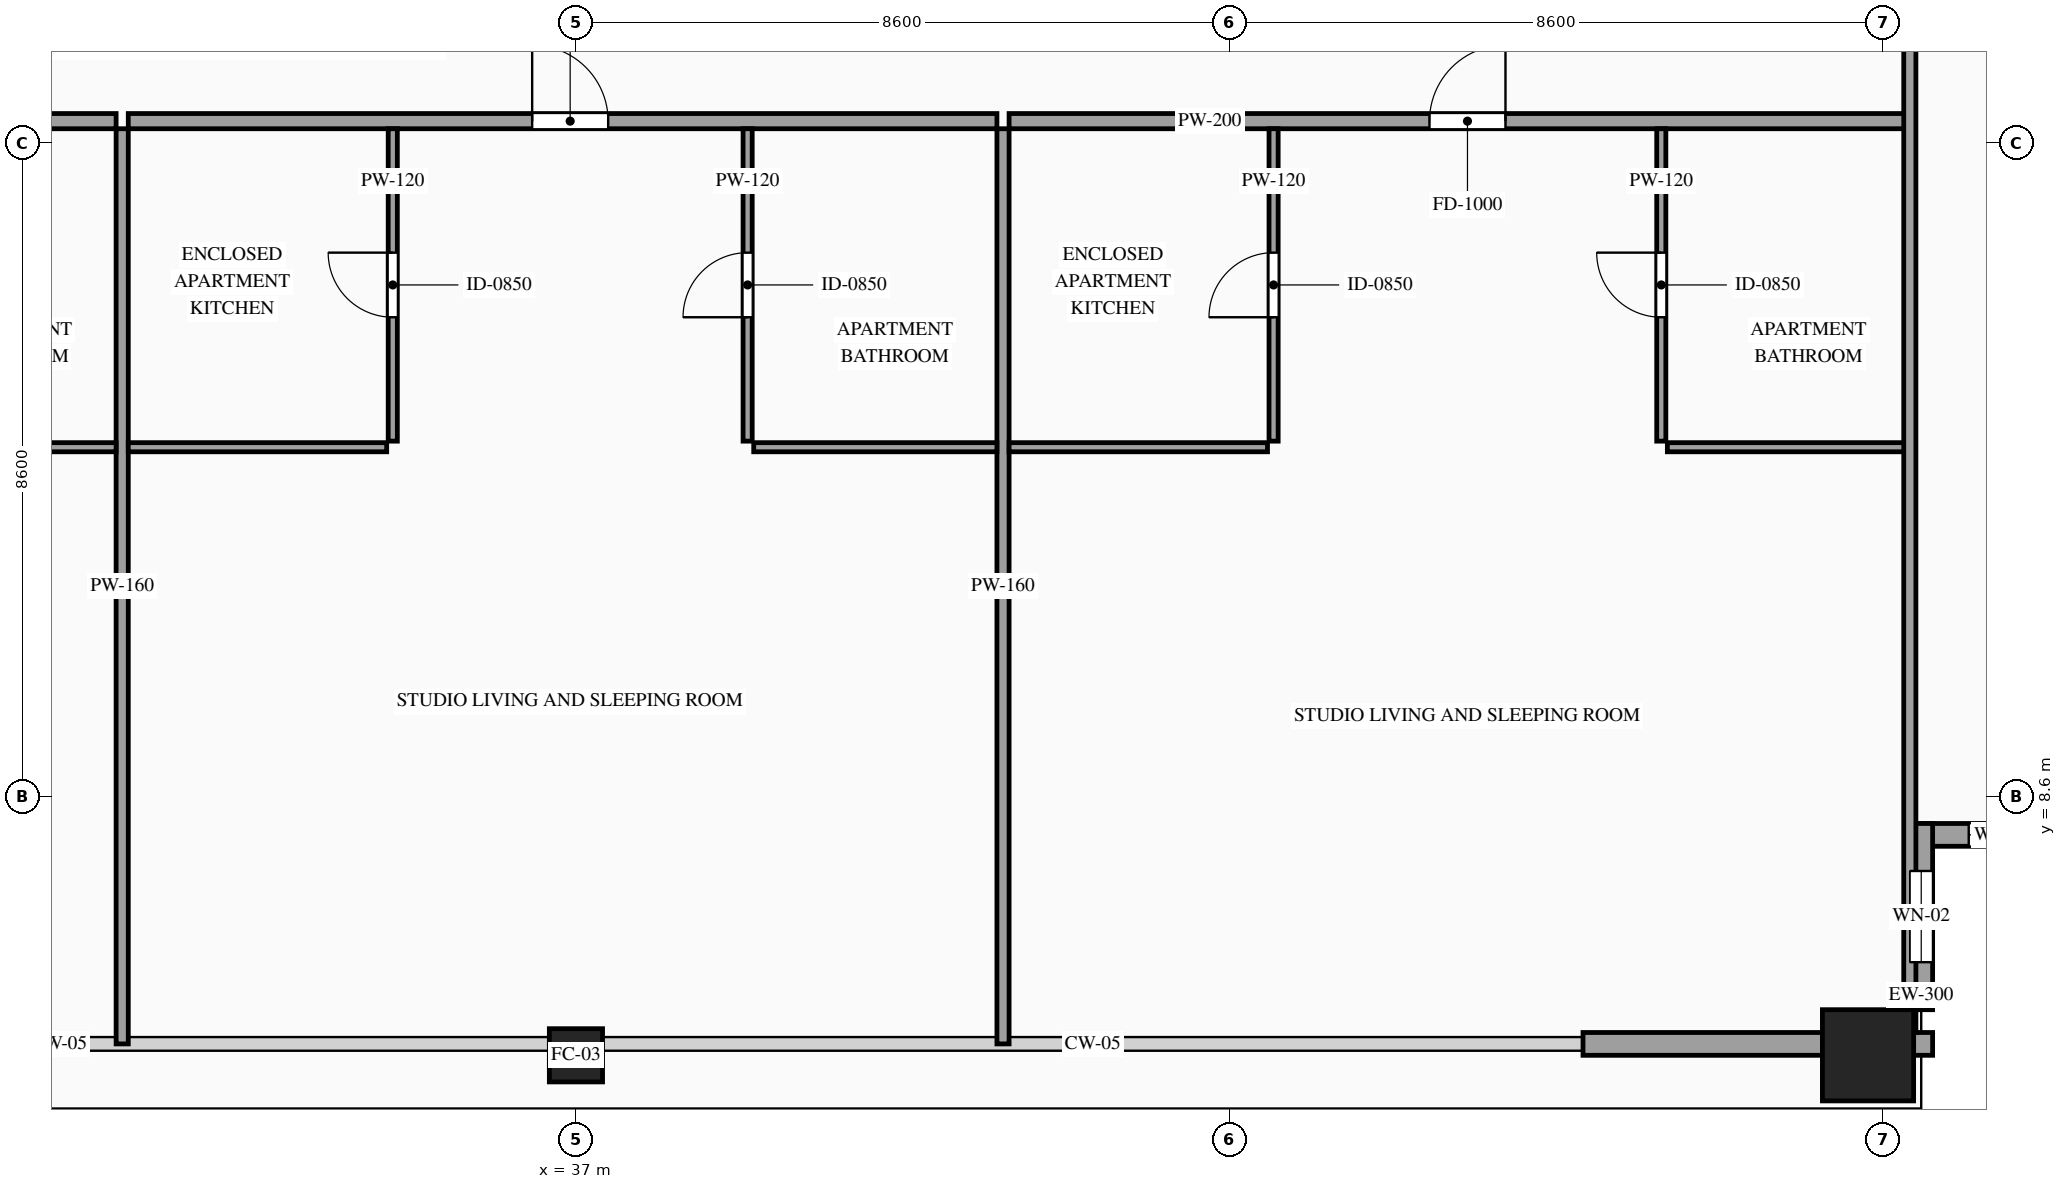
"""IFC4 building model, lengths in metres.
Left out: names, types, materials, properties, quantities, classifications, styles, units other than length and angle.
Written with IfcOpenShell. Run it as: python <this file> out.ifc"""

import sys

from ifc_helpers import new_model, si_unit, direction, frame, frame_2d, origin, origin_2d, place, context, subcontext, project, spatial, rectangle, hollow_rectangle, extrude, source, transform, mapped, element, fill, save


model = new_model("IFC4")
c1 = context("Model", 3, precision=1e-05, world=origin(), true_north=direction((0.0, 1.0)))
c2 = subcontext(c1, "Body", "Model", "MODEL_VIEW")
j1 = project(units=[si_unit("LENGTHUNIT", "METRE"), si_unit("PLANEANGLEUNIT", "RADIAN")], contexts=[c1])
p1 = place(None, origin())
s1 = spatial("IfcSite", under=j1, at=p1, CompositionType="ELEMENT")
p2 = place(p1, origin())
s2 = spatial("IfcBuilding", under=s1, at=p2, CompositionType="ELEMENT")
p3 = place(p2, frame((0.0, 0.0, 238.1)))
s3 = spatial("IfcBuildingStorey", under=s2, at=p3, CompositionType="ELEMENT", Elevation=238.1)
m1 = source(origin(), c2, "Body", "SweptSolid", [
    extrude(hollow_rectangle(XDim=0.7, YDim=0.7, WallThickness=0.032, at=origin_2d()), origin(), (0.0, 0.0, 1.0), 3.5),
])
p4 = place(p3, frame((37.0, 5.2, 0.0), z_axis=(0.0, 0.0, 1.0), x_axis=(1.0, 0.0, 0.0)))
e1 = element("IfcColumn", 1, at=p4, inside=s3, PredefinedType="COLUMN", context=c2, shape_type="MappedRepresentation", body=[
    mapped(m1, transform((0.0, 0.0, 0.0), scale=1.0)),
])
m2 = source(origin(), c2, "Body", "SweptSolid", [
    extrude(hollow_rectangle(XDim=1.2, YDim=1.2, WallThickness=0.055, at=origin_2d()), origin(), (0.0, 0.0, 1.0), 3.5),
])
p5 = place(p3, frame((54.0, 5.2, 0.0), z_axis=(0.0, 0.0, 1.0), x_axis=(1.0, 0.0, 0.0)))
e2 = element("IfcColumn", 2, at=p5, inside=s3, PredefinedType="COLUMN", context=c2, shape_type="MappedRepresentation", body=[
    mapped(m2, transform((0.0, 0.0, 0.0), scale=1.0)),
])
p6 = place(p3, frame((54.55, 8.1, 0.0), z_axis=(0.0, 0.0, 1.0), x_axis=(1.0, 0.0, 0.0)))
e3 = element("IfcWall", 3, at=p6, inside=s3, PredefinedType="SOLIDWALL", context=c2, shape_type="SweptSolid", body=[
    extrude(rectangle(XDim=2.45, YDim=0.3, at=frame_2d((1.225, 0.0))), origin(), (0.0, 0.0, 1.0), 3.28),
])
p7 = place(p6, frame((0.775, 0.0, 0.85)))
e4 = element("IfcOpeningElement", 4, at=p7, cuts=e3, PredefinedType="OPENING", context=c2, shape_type="SweptSolid", body=[
    extrude(rectangle(XDim=0.9, YDim=1.5, at=frame_2d((0.45, 0.75))), frame((0.0, 0.165, 0.0), z_axis=(0.0, -1.0, 0.0), x_axis=(1.0, 0.0, 0.0)), (0.0, 0.0, 1.0), 0.33),
])
p8 = place(p3, frame((54.7, 5.8, 0.0), z_axis=(0.0, 0.0, 1.0), x_axis=(0.0, 1.0, 0.0)))
e5 = element("IfcWall", 5, at=p8, inside=s3, PredefinedType="SOLIDWALL", context=c2, shape_type="SweptSolid", body=[
    extrude(rectangle(XDim=2.45, YDim=0.3, at=frame_2d((1.225, 0.0))), origin(), (0.0, 0.0, 1.0), 3.28),
])
p9 = place(p8, frame((0.625, 0.0, 0.85)))
e6 = element("IfcOpeningElement", 6, at=p9, cuts=e5, PredefinedType="OPENING", context=c2, shape_type="SweptSolid", body=[
    extrude(rectangle(XDim=1.2, YDim=2.1, at=frame_2d((0.6, 1.05))), frame((0.0, 0.165, 0.0), z_axis=(0.0, -1.0, 0.0), x_axis=(1.0, 0.0, 0.0)), (0.0, 0.0, 1.0), 0.33),
])
m3 = source(origin(), c2, "Body", "SweptSolid", [
    extrude(rectangle(XDim=0.25, YDim=0.3, at=frame_2d((0.125, 0.0))), origin(), (0.0, 0.0, 1.0), 3.28),
])
p10 = place(p3, frame((54.6, 5.35, 0.0), z_axis=(0.0, 0.0, 1.0), x_axis=(1.0, 0.0, 0.0)))
e7 = element("IfcWall", 7, at=p10, inside=s3, PredefinedType="SOLIDWALL", context=c2, shape_type="MappedRepresentation", body=[
    mapped(m3, transform((0.0, 0.0, 0.0), scale=1.0)),
])
m4 = source(origin(), c2, "Body", "SweptSolid", [
    extrude(rectangle(XDim=3.15, YDim=0.3, at=frame_2d((1.575, 0.0))), origin(), (0.0, 0.0, 1.0), 2.835),
])
p11 = place(p3, frame((50.25, 5.35, 0.0), z_axis=(0.0, 0.0, 1.0), x_axis=(1.0, 0.0, 0.0)))
e8 = element("IfcWall", 8, at=p11, inside=s3, PredefinedType="SOLIDWALL", context=c2, shape_type="MappedRepresentation", body=[
    mapped(m4, transform((0.0, 0.0, 0.0), scale=1.0)),
])
p12 = place(p3, frame((19.44, 17.49, 0.0), z_axis=(0.0, 0.0, 1.0), x_axis=(1.0, 0.0, 0.0)))
e9 = element("IfcWall", 9, at=p12, inside=s3, PredefinedType="PARTITIONING", context=c2, shape_type="SweptSolid", body=[
    extrude(rectangle(XDim=11.51, YDim=0.2, at=frame_2d((5.755, 0.0))), origin(), (0.0, 0.0, 1.0), 3.28),
])
p13 = place(p12, frame((5.355, 0.0, 0.0)))
e10 = element("IfcOpeningElement", 10, at=p13, cuts=e9, PredefinedType="OPENING", context=c2, shape_type="SweptSolid", body=[
    extrude(rectangle(XDim=1.0, YDim=2.2, at=frame_2d((0.5, 1.1))), frame((0.0, 0.115, 0.0), z_axis=(0.0, -1.0, 0.0), x_axis=(1.0, 0.0, 0.0)), (0.0, 0.0, 1.0), 0.23),
])
m5 = source(origin(), c2, "Body", "SweptSolid", [
    extrude(rectangle(XDim=12.04, YDim=0.16, at=frame_2d((6.02, 0.0))), origin(), (0.0, 0.0, 1.0), 3.28),
])
p14 = place(p3, frame((31.03, 5.35, 0.0), z_axis=(0.0, 0.0, 1.0), x_axis=(0.0, 1.0, 0.0)))
e11 = element("IfcWall", 11, at=p14, inside=s3, PredefinedType="PARTITIONING", context=c2, shape_type="MappedRepresentation", body=[
    mapped(m5, transform((0.0, 0.0, 0.0), scale=1.0)),
])
m6 = source(origin(), c2, "Body", "SweptSolid", [
    extrude(rectangle(XDim=3.2, YDim=0.12, at=frame_2d((1.6, 0.0))), origin(), (0.0, 0.0, 1.0), 3.28),
])
p15 = place(p3, frame((27.75, 13.2, 0.0), z_axis=(0.0, 0.0, 1.0), x_axis=(1.0, 0.0, 0.0)))
e12 = element("IfcWall", 12, at=p15, inside=s3, PredefinedType="PARTITIONING", context=c2, shape_type="MappedRepresentation", body=[
    mapped(m6, transform((0.0, 0.0, 0.0), scale=1.0)),
])
p16 = place(p3, frame((31.11, 17.49, 0.0), z_axis=(0.0, 0.0, 1.0), x_axis=(1.0, 0.0, 0.0)))
e13 = element("IfcWall", 13, at=p16, inside=s3, PredefinedType="PARTITIONING", context=c2, shape_type="SweptSolid", body=[
    extrude(rectangle(XDim=11.429, YDim=0.2, at=frame_2d((5.714, 0.0))), origin(), (0.0, 0.0, 1.0), 3.28),
])
p17 = place(p16, frame((5.314, 0.0, 0.0)))
e14 = element("IfcOpeningElement", 14, at=p17, cuts=e13, PredefinedType="OPENING", context=c2, shape_type="SweptSolid", body=[
    extrude(rectangle(XDim=1.0, YDim=2.2, at=frame_2d((0.5, 1.1))), frame((0.0, 0.115, 0.0), z_axis=(0.0, -1.0, 0.0), x_axis=(1.0, 0.0, 0.0)), (0.0, 0.0, 1.0), 0.23),
])
p18 = place(p3, frame((42.619, 5.35, 0.0), z_axis=(0.0, 0.0, 1.0), x_axis=(0.0, 1.0, 0.0)))
e15 = element("IfcWall", 15, at=p18, inside=s3, PredefinedType="PARTITIONING", context=c2, shape_type="MappedRepresentation", body=[
    mapped(m5, transform((0.0, 0.0, 0.0), scale=1.0)),
])
m7 = source(origin(), c2, "Body", "SweptSolid", [
    extrude(rectangle(XDim=3.4, YDim=0.12, at=frame_2d((1.7, 0.0))), origin(), (0.0, 0.0, 1.0), 3.28),
])
p19 = place(p3, frame((31.11, 13.2, 0.0), z_axis=(0.0, 0.0, 1.0), x_axis=(1.0, 0.0, 0.0)))
e16 = element("IfcWall", 16, at=p19, inside=s3, PredefinedType="PARTITIONING", context=c2, shape_type="MappedRepresentation", body=[
    mapped(m7, transform((0.0, 0.0, 0.0), scale=1.0)),
])
p20 = place(p3, frame((34.59, 13.28, 0.0), z_axis=(0.0, 0.0, 1.0), x_axis=(0.0, 1.0, 0.0)))
e17 = element("IfcWall", 17, at=p20, inside=s3, PredefinedType="PARTITIONING", context=c2, shape_type="SweptSolid", body=[
    extrude(rectangle(XDim=4.11, YDim=0.12, at=frame_2d((2.055, 0.0))), origin(), (0.0, 0.0, 1.0), 3.28),
])
p21 = place(p20, frame((1.63, 0.0, 0.0)))
e18 = element("IfcOpeningElement", 18, at=p21, cuts=e17, PredefinedType="OPENING", context=c2, shape_type="SweptSolid", body=[
    extrude(rectangle(XDim=0.85, YDim=2.1, at=frame_2d((0.425, 1.05))), frame((0.0, 0.075, 0.0), z_axis=(0.0, -1.0, 0.0), x_axis=(1.0, 0.0, 0.0)), (0.0, 0.0, 1.0), 0.15),
])
p22 = place(p3, frame((39.339, 13.2, 0.0), z_axis=(0.0, 0.0, 1.0), x_axis=(1.0, 0.0, 0.0)))
e19 = element("IfcWall", 19, at=p22, inside=s3, PredefinedType="PARTITIONING", context=c2, shape_type="MappedRepresentation", body=[
    mapped(m6, transform((0.0, 0.0, 0.0), scale=1.0)),
])
p23 = place(p3, frame((39.259, 13.28, 0.0), z_axis=(0.0, 0.0, 1.0), x_axis=(0.0, 1.0, 0.0)))
e20 = element("IfcWall", 20, at=p23, inside=s3, PredefinedType="PARTITIONING", context=c2, shape_type="SweptSolid", body=[
    extrude(rectangle(XDim=4.11, YDim=0.12, at=frame_2d((2.055, 0.0))), origin(), (0.0, 0.0, 1.0), 3.28),
])
p24 = place(p23, frame((1.63, 0.0, 0.0)))
e21 = element("IfcOpeningElement", 21, at=p24, cuts=e20, PredefinedType="OPENING", context=c2, shape_type="SweptSolid", body=[
    extrude(rectangle(XDim=0.85, YDim=2.1, at=frame_2d((0.425, 1.05))), frame((0.0, 0.075, 0.0), z_axis=(0.0, -1.0, 0.0), x_axis=(1.0, 0.0, 0.0)), (0.0, 0.0, 1.0), 0.15),
])
p25 = place(p3, frame((42.699, 17.49, 0.0), z_axis=(0.0, 0.0, 1.0), x_axis=(1.0, 0.0, 0.0)))
e22 = element("IfcWall", 22, at=p25, inside=s3, PredefinedType="PARTITIONING", context=c2, shape_type="SweptSolid", body=[
    extrude(rectangle(XDim=11.861, YDim=0.2, at=frame_2d((5.931, 0.0))), origin(), (0.0, 0.0, 1.0), 3.28),
])
p26 = place(p25, frame((5.531, 0.0, 0.0)))
e23 = element("IfcOpeningElement", 23, at=p26, cuts=e22, PredefinedType="OPENING", context=c2, shape_type="SweptSolid", body=[
    extrude(rectangle(XDim=1.0, YDim=2.2, at=frame_2d((0.5, 1.1))), frame((0.0, 0.115, 0.0), z_axis=(0.0, -1.0, 0.0), x_axis=(1.0, 0.0, 0.0)), (0.0, 0.0, 1.0), 0.23),
])
m8 = source(origin(), c2, "Body", "SweptSolid", [
    extrude(rectangle(XDim=3.4, YDim=0.12, at=frame_2d((1.7, 0.0))), origin(), (0.0, 0.0, 1.0), 3.28),
])
p27 = place(p3, frame((42.699, 13.2, 0.0), z_axis=(0.0, 0.0, 1.0), x_axis=(1.0, 0.0, 0.0)))
e24 = element("IfcWall", 24, at=p27, inside=s3, PredefinedType="PARTITIONING", context=c2, shape_type="MappedRepresentation", body=[
    mapped(m8, transform((0.0, 0.0, 0.0), scale=1.0)),
])
p28 = place(p3, frame((46.179, 13.28, 0.0), z_axis=(0.0, 0.0, 1.0), x_axis=(0.0, 1.0, 0.0)))
e25 = element("IfcWall", 25, at=p28, inside=s3, PredefinedType="PARTITIONING", context=c2, shape_type="SweptSolid", body=[
    extrude(rectangle(XDim=4.11, YDim=0.12, at=frame_2d((2.055, 0.0))), origin(), (0.0, 0.0, 1.0), 3.28),
])
p29 = place(p28, frame((1.63, 0.0, 0.0)))
e26 = element("IfcOpeningElement", 26, at=p29, cuts=e25, PredefinedType="OPENING", context=c2, shape_type="SweptSolid", body=[
    extrude(rectangle(XDim=0.85, YDim=2.1, at=frame_2d((0.425, 1.05))), frame((0.0, 0.075, 0.0), z_axis=(0.0, -1.0, 0.0), x_axis=(1.0, 0.0, 0.0)), (0.0, 0.0, 1.0), 0.15),
])
p30 = place(p3, frame((51.36, 13.2, 0.0), z_axis=(0.0, 0.0, 1.0), x_axis=(1.0, 0.0, 0.0)))
e27 = element("IfcWall", 27, at=p30, inside=s3, PredefinedType="PARTITIONING", context=c2, shape_type="MappedRepresentation", body=[
    mapped(m6, transform((0.0, 0.0, 0.0), scale=1.0)),
])
p31 = place(p3, frame((51.28, 13.28, 0.0), z_axis=(0.0, 0.0, 1.0), x_axis=(0.0, 1.0, 0.0)))
e28 = element("IfcWall", 28, at=p31, inside=s3, PredefinedType="PARTITIONING", context=c2, shape_type="SweptSolid", body=[
    extrude(rectangle(XDim=4.11, YDim=0.12, at=frame_2d((2.055, 0.0))), origin(), (0.0, 0.0, 1.0), 3.28),
])
p32 = place(p31, frame((1.63, 0.0, 0.0)))
e29 = element("IfcOpeningElement", 29, at=p32, cuts=e28, PredefinedType="OPENING", context=c2, shape_type="SweptSolid", body=[
    extrude(rectangle(XDim=0.85, YDim=2.1, at=frame_2d((0.425, 1.05))), frame((0.0, 0.075, 0.0), z_axis=(0.0, -1.0, 0.0), x_axis=(1.0, 0.0, 0.0)), (0.0, 0.0, 1.0), 0.15),
])
m9 = source(origin(), c2, "Body", "SweptSolid", [
    extrude(rectangle(XDim=26.69, YDim=0.16, at=frame_2d((13.345, 0.0))), origin(), (0.0, 0.0, 1.0), 3.28),
])
p33 = place(p3, frame((54.55, 5.5, 0.0), z_axis=(0.0, 0.0, 1.0), x_axis=(0.0, 1.0, 0.0)))
e30 = element("IfcWall", 30, at=p33, inside=s3, PredefinedType="PARTITIONING", context=c2, shape_type="MappedRepresentation", body=[
    mapped(m9, transform((0.0, 0.0, 0.0), scale=1.0)),
])
m10 = source(origin(), c2, "Body", "SweptSolid", [
    extrude(rectangle(XDim=0.9, YDim=1.5, at=frame_2d((0.45, 0.75))), frame((0.0, 0.03, 0.0), z_axis=(0.0, -1.0, 0.0), x_axis=(1.0, 0.0, 0.0)), (0.0, 0.0, 1.0), 0.06),
])
p34 = place(p7, origin())
e31 = element("IfcWindow", 31, at=p34, inside=s3, PartitioningType="SINGLE_PANEL", PredefinedType="WINDOW", context=c2, shape_type="MappedRepresentation", body=[
    mapped(m10, transform((0.0, 0.0, 0.0), scale=1.0)),
])
fill(e4, e31)
m11 = source(origin(), c2, "Body", "SweptSolid", [
    extrude(rectangle(XDim=1.2, YDim=2.1, at=frame_2d((0.6, 1.05))), frame((0.0, 0.03, 0.0), z_axis=(0.0, -1.0, 0.0), x_axis=(1.0, 0.0, 0.0)), (0.0, 0.0, 1.0), 0.06),
])
p35 = place(p9, origin())
e32 = element("IfcWindow", 32, at=p35, inside=s3, PartitioningType="SINGLE_PANEL", PredefinedType="WINDOW", context=c2, shape_type="MappedRepresentation", body=[
    mapped(m11, transform((0.0, 0.0, 0.0), scale=1.0)),
])
fill(e6, e32)
m12 = source(origin(), c2, "Body", "SweptSolid", [
    extrude(rectangle(XDim=1.0, YDim=2.2, at=frame_2d((0.5, 1.1))), frame((0.0, 0.025, 0.0), z_axis=(0.0, -1.0, 0.0), x_axis=(1.0, 0.0, 0.0)), (0.0, 0.0, 1.0), 0.05),
])
p36 = place(p17, origin())
e33 = element("IfcDoor", 33, at=p36, inside=s3, OperationType="SINGLE_SWING_LEFT", PredefinedType="DOOR", context=c2, shape_type="MappedRepresentation", body=[
    mapped(m12, transform((0.0, 0.0, 0.0), scale=1.0)),
])
fill(e14, e33)
m13 = source(origin(), c2, "Body", "SweptSolid", [
    extrude(rectangle(XDim=0.85, YDim=2.1, at=frame_2d((0.425, 1.05))), frame((0.0, 0.025, 0.0), z_axis=(0.0, -1.0, 0.0), x_axis=(1.0, 0.0, 0.0)), (0.0, 0.0, 1.0), 0.05),
])
p37 = place(p21, origin())
e34 = element("IfcDoor", 34, at=p37, inside=s3, OperationType="SINGLE_SWING_RIGHT", PredefinedType="DOOR", context=c2, shape_type="MappedRepresentation", body=[
    mapped(m13, transform((0.0, 0.0, 0.0), scale=1.0)),
])
fill(e18, e34)
p38 = place(p24, origin())
e35 = element("IfcDoor", 35, at=p38, inside=s3, OperationType="SINGLE_SWING_LEFT", PredefinedType="DOOR", context=c2, shape_type="MappedRepresentation", body=[
    mapped(m13, transform((0.0, 0.0, 0.0), scale=1.0)),
])
fill(e21, e35)
p39 = place(p26, origin())
e36 = element("IfcDoor", 36, at=p39, inside=s3, OperationType="SINGLE_SWING_RIGHT", PredefinedType="DOOR", context=c2, shape_type="MappedRepresentation", body=[
    mapped(m12, transform((0.0, 0.0, 0.0), scale=1.0)),
])
fill(e23, e36)
p40 = place(p29, origin())
e37 = element("IfcDoor", 37, at=p40, inside=s3, OperationType="SINGLE_SWING_LEFT", PredefinedType="DOOR", context=c2, shape_type="MappedRepresentation", body=[
    mapped(m13, transform((0.0, 0.0, 0.0), scale=1.0)),
])
fill(e26, e37)
p41 = place(p32, origin())
e38 = element("IfcDoor", 38, at=p41, inside=s3, OperationType="SINGLE_SWING_RIGHT", PredefinedType="DOOR", context=c2, shape_type="MappedRepresentation", body=[
    mapped(m13, transform((0.0, 0.0, 0.0), scale=1.0)),
])
fill(e29, e38)
save(model, sys.argv[1])
